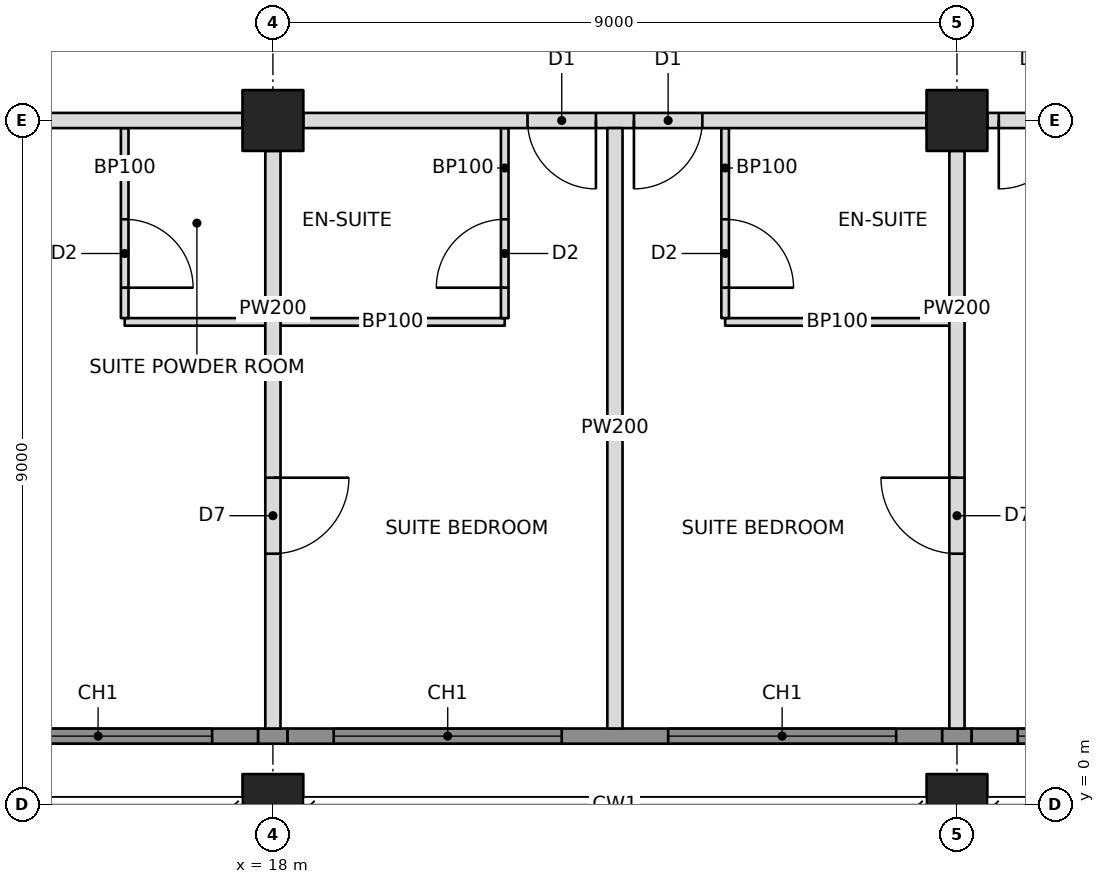
"""IFC4 building model, lengths in metres.
Left out: names, types, materials, properties, quantities, classifications, styles, units other than length and angle.
Written with IfcOpenShell. Run it as: python <this file> out.ifc"""

import sys

from ifc_helpers import new_model, si_unit, direction, frame, frame_2d, origin, origin_2d, place, context, subcontext, project, spatial, rectangle, hollow_rectangle, extrude, element, fill, save


model = new_model("IFC4")
c1 = context("Model", 3, precision=1e-05, world=origin(), true_north=direction((0.0, 1.0)))
c2 = subcontext(c1, "Body", "Model", "MODEL_VIEW")
j1 = project(units=[si_unit("LENGTHUNIT", "METRE"), si_unit("PLANEANGLEUNIT", "RADIAN")], contexts=[c1])
p1 = place(None, origin())
s1 = spatial("IfcSite", under=j1, at=p1, CompositionType="ELEMENT")
p2 = place(p1, origin())
s2 = spatial("IfcBuilding", under=s1, at=p2, CompositionType="ELEMENT")
p3 = place(p2, frame((0.0, 0.0, 214.8)))
s3 = spatial("IfcBuildingStorey", under=s2, at=p3, CompositionType="ELEMENT", Elevation=214.8)
p4 = place(p3, frame((18.0, 0.0, 0.0), z_axis=(0.0, 0.0, 1.0), x_axis=(1.0, 0.0, 0.0)))
e1 = element("IfcColumn", 1, at=p4, inside=s3, PredefinedType="COLUMN", context=c2, shape_type="SweptSolid", body=[
    extrude(hollow_rectangle(XDim=0.8, YDim=0.8, WallThickness=0.06, at=origin_2d()), origin(), (0.0, 0.0, 1.0), 3.4),
])
p5 = place(p3, frame((18.0, 9.0, 0.0), z_axis=(0.0, 0.0, 1.0), x_axis=(1.0, 0.0, 0.0)))
e2 = element("IfcColumn", 2, at=p5, inside=s3, PredefinedType="COLUMN", context=c2, shape_type="SweptSolid", body=[
    extrude(hollow_rectangle(XDim=0.8, YDim=0.8, WallThickness=0.05, at=origin_2d()), origin(), (0.0, 0.0, 1.0), 3.4),
])
p6 = place(p3, frame((27.0, 0.0, 0.0), z_axis=(0.0, 0.0, 1.0), x_axis=(1.0, 0.0, 0.0)))
e3 = element("IfcColumn", 3, at=p6, inside=s3, PredefinedType="COLUMN", context=c2, shape_type="SweptSolid", body=[
    extrude(hollow_rectangle(XDim=0.8, YDim=0.8, WallThickness=0.06, at=origin_2d()), origin(), (0.0, 0.0, 1.0), 3.4),
])
p7 = place(p3, frame((27.0, 9.0, 0.0), z_axis=(0.0, 0.0, 1.0), x_axis=(1.0, 0.0, 0.0)))
e4 = element("IfcColumn", 4, at=p7, inside=s3, PredefinedType="COLUMN", context=c2, shape_type="SweptSolid", body=[
    extrude(hollow_rectangle(XDim=0.8, YDim=0.8, WallThickness=0.05, at=origin_2d()), origin(), (0.0, 0.0, 1.0), 3.4),
])
p8 = place(p3, frame((9.4, 9.0, 0.0), z_axis=(0.0, 0.0, 1.0), x_axis=(1.0, 0.0, 0.0)))
e5 = element("IfcWall", 5, at=p8, inside=s3, PredefinedType="PARTITIONING", context=c2, shape_type="SweptSolid", body=[
    extrude(rectangle(XDim=8.2, YDim=0.2, at=frame_2d((4.1, 0.0))), origin(), (0.0, 0.0, 1.0), 2.405),
])
p9 = place(p8, frame((0.15, 0.0, 0.0)))
e6 = element("IfcOpeningElement", 6, at=p9, cuts=e5, PredefinedType="OPENING", context=c2, shape_type="SweptSolid", body=[
    extrude(rectangle(XDim=0.9, YDim=2.1, at=frame_2d((0.45, 1.05))), frame((0.0, 0.11, 0.0), z_axis=(0.0, -1.0, 0.0), x_axis=(1.0, 0.0, 0.0)), (0.0, 0.0, 1.0), 0.22),
])
p10 = place(p3, frame((18.4, 9.0, 0.0), z_axis=(0.0, 0.0, 1.0), x_axis=(1.0, 0.0, 0.0)))
e7 = element("IfcWall", 7, at=p10, inside=s3, PredefinedType="PARTITIONING", context=c2, shape_type="SweptSolid", body=[
    extrude(rectangle(XDim=8.2, YDim=0.2, at=frame_2d((4.1, 0.0))), origin(), (0.0, 0.0, 1.0), 2.405),
])
p11 = place(p10, frame((2.95, 0.0, 0.0)))
e8 = element("IfcOpeningElement", 8, at=p11, cuts=e7, PredefinedType="OPENING", context=c2, shape_type="SweptSolid", body=[
    extrude(rectangle(XDim=0.9, YDim=2.1, at=frame_2d((0.45, 1.05))), frame((0.0, 0.11, 0.0), z_axis=(0.0, -1.0, 0.0), x_axis=(1.0, 0.0, 0.0)), (0.0, 0.0, 1.0), 0.22),
])
p12 = place(p10, frame((4.35, 0.0, 0.0)))
e9 = element("IfcOpeningElement", 9, at=p12, cuts=e7, PredefinedType="OPENING", context=c2, shape_type="SweptSolid", body=[
    extrude(rectangle(XDim=0.9, YDim=2.1, at=frame_2d((0.45, 1.05))), frame((0.0, 0.11, 0.0), z_axis=(0.0, -1.0, 0.0), x_axis=(1.0, 0.0, 0.0)), (0.0, 0.0, 1.0), 0.22),
])
p13 = place(p3, frame((27.4, 9.0, 0.0), z_axis=(0.0, 0.0, 1.0), x_axis=(1.0, 0.0, 0.0)))
e10 = element("IfcWall", 10, at=p13, inside=s3, PredefinedType="PARTITIONING", context=c2, shape_type="SweptSolid", body=[
    extrude(rectangle(XDim=8.2, YDim=0.2, at=frame_2d((4.1, 0.0))), origin(), (0.0, 0.0, 1.0), 2.405),
])
p14 = place(p13, frame((0.15, 0.0, 0.0)))
e11 = element("IfcOpeningElement", 11, at=p14, cuts=e10, PredefinedType="OPENING", context=c2, shape_type="SweptSolid", body=[
    extrude(rectangle(XDim=0.9, YDim=2.1, at=frame_2d((0.45, 1.05))), frame((0.0, 0.11, 0.0), z_axis=(0.0, -1.0, 0.0), x_axis=(1.0, 0.0, 0.0)), (0.0, 0.0, 1.0), 0.22),
])
p15 = place(p3, frame((18.0, 8.6, 0.0), z_axis=(0.0, 0.0, 1.0), x_axis=(0.0, -1.0, 0.0)))
e12 = element("IfcWall", 12, at=p15, inside=s3, PredefinedType="PARTITIONING", context=c2, shape_type="SweptSolid", body=[
    extrude(rectangle(XDim=7.6, YDim=0.2, at=frame_2d((3.8, 0.0))), origin(), (0.0, 0.0, 1.0), 2.405),
])
p16 = place(p15, frame((4.3, 0.0, 0.0)))
e13 = element("IfcOpeningElement", 13, at=p16, cuts=e12, PredefinedType="OPENING", context=c2, shape_type="SweptSolid", body=[
    extrude(rectangle(XDim=1.0, YDim=2.1, at=frame_2d((0.5, 1.05))), frame((0.0, 0.11, 0.0), z_axis=(0.0, -1.0, 0.0), x_axis=(1.0, 0.0, 0.0)), (0.0, 0.0, 1.0), 0.22),
])
p17 = place(p3, frame((22.5, 8.9, 0.0), z_axis=(0.0, 0.0, 1.0), x_axis=(0.0, -1.0, 0.0)))
e14 = element("IfcWall", 14, at=p17, inside=s3, PredefinedType="PARTITIONING", context=c2, shape_type="SweptSolid", body=[
    extrude(rectangle(XDim=7.9, YDim=0.2, at=frame_2d((3.95, 0.0))), origin(), (0.0, 0.0, 1.0), 2.404),
])
p18 = place(p3, frame((27.0, 8.6, 0.0), z_axis=(0.0, 0.0, 1.0), x_axis=(0.0, -1.0, 0.0)))
e15 = element("IfcWall", 15, at=p18, inside=s3, PredefinedType="PARTITIONING", context=c2, shape_type="SweptSolid", body=[
    extrude(rectangle(XDim=7.6, YDim=0.2, at=frame_2d((3.8, 0.0))), origin(), (0.0, 0.0, 1.0), 2.405),
])
p19 = place(p18, frame((4.3, 0.0, 0.0)))
e16 = element("IfcOpeningElement", 16, at=p19, cuts=e15, PredefinedType="OPENING", context=c2, shape_type="SweptSolid", body=[
    extrude(rectangle(XDim=1.0, YDim=2.1, at=frame_2d((0.5, 1.05))), frame((0.0, 0.11, 0.0), z_axis=(0.0, -1.0, 0.0), x_axis=(1.0, 0.0, 0.0)), (0.0, 0.0, 1.0), 0.22),
])
p20 = place(p3, frame((16.05, 6.35, 0.0), z_axis=(0.0, 0.0, 1.0), x_axis=(1.0, 0.0, 0.0)))
e17 = element("IfcWall", 17, at=p20, inside=s3, PredefinedType="PARTITIONING", context=c2, shape_type="SweptSolid", body=[
    extrude(rectangle(XDim=1.85, YDim=0.1, at=frame_2d((0.925, 0.0))), origin(), (0.0, 0.0, 1.0), 2.404),
])
p21 = place(p3, frame((16.05, 8.9, 0.0), z_axis=(0.0, 0.0, 1.0), x_axis=(0.0, -1.0, 0.0)))
e18 = element("IfcWall", 18, at=p21, inside=s3, PredefinedType="PARTITIONING", context=c2, shape_type="SweptSolid", body=[
    extrude(rectangle(XDim=2.5, YDim=0.1, at=frame_2d((1.25, 0.0))), origin(), (0.0, 0.0, 1.0), 2.404),
])
p22 = place(p21, frame((1.2, 0.0, 0.0)))
e19 = element("IfcOpeningElement", 19, at=p22, cuts=e18, PredefinedType="OPENING", context=c2, shape_type="SweptSolid", body=[
    extrude(rectangle(XDim=0.9, YDim=2.1, at=frame_2d((0.45, 1.05))), frame((0.0, 0.06, 0.0), z_axis=(0.0, -1.0, 0.0), x_axis=(1.0, 0.0, 0.0)), (0.0, 0.0, 1.0), 0.12),
])
p23 = place(p3, frame((18.1, 6.35, 0.0), z_axis=(0.0, 0.0, 1.0), x_axis=(1.0, 0.0, 0.0)))
e20 = element("IfcWall", 20, at=p23, inside=s3, PredefinedType="PARTITIONING", context=c2, shape_type="SweptSolid", body=[
    extrude(rectangle(XDim=2.95, YDim=0.1, at=frame_2d((1.475, 0.0))), origin(), (0.0, 0.0, 1.0), 2.404),
])
p24 = place(p3, frame((21.05, 8.9, 0.0), z_axis=(0.0, 0.0, 1.0), x_axis=(0.0, -1.0, 0.0)))
e21 = element("IfcWall", 21, at=p24, inside=s3, PredefinedType="PARTITIONING", context=c2, shape_type="SweptSolid", body=[
    extrude(rectangle(XDim=2.5, YDim=0.1, at=frame_2d((1.25, 0.0))), origin(), (0.0, 0.0, 1.0), 2.404),
])
p25 = place(p24, frame((1.2, 0.0, 0.0)))
e22 = element("IfcOpeningElement", 22, at=p25, cuts=e21, PredefinedType="OPENING", context=c2, shape_type="SweptSolid", body=[
    extrude(rectangle(XDim=0.9, YDim=2.1, at=frame_2d((0.45, 1.05))), frame((0.0, 0.06, 0.0), z_axis=(0.0, -1.0, 0.0), x_axis=(1.0, 0.0, 0.0)), (0.0, 0.0, 1.0), 0.12),
])
p26 = place(p3, frame((23.95, 6.35, 0.0), z_axis=(0.0, 0.0, 1.0), x_axis=(1.0, 0.0, 0.0)))
e23 = element("IfcWall", 23, at=p26, inside=s3, PredefinedType="PARTITIONING", context=c2, shape_type="SweptSolid", body=[
    extrude(rectangle(XDim=2.95, YDim=0.1, at=frame_2d((1.475, 0.0))), origin(), (0.0, 0.0, 1.0), 2.404),
])
p27 = place(p3, frame((23.95, 8.9, 0.0), z_axis=(0.0, 0.0, 1.0), x_axis=(0.0, -1.0, 0.0)))
e24 = element("IfcWall", 24, at=p27, inside=s3, PredefinedType="PARTITIONING", context=c2, shape_type="SweptSolid", body=[
    extrude(rectangle(XDim=2.5, YDim=0.1, at=frame_2d((1.25, 0.0))), origin(), (0.0, 0.0, 1.0), 2.404),
])
p28 = place(p27, frame((1.2, 0.0, 0.0)))
e25 = element("IfcOpeningElement", 25, at=p28, cuts=e24, PredefinedType="OPENING", context=c2, shape_type="SweptSolid", body=[
    extrude(rectangle(XDim=0.9, YDim=2.1, at=frame_2d((0.45, 1.05))), frame((0.0, 0.06, 0.0), z_axis=(0.0, -1.0, 0.0), x_axis=(1.0, 0.0, 0.0)), (0.0, 0.0, 1.0), 0.12),
])
p29 = place(p3, frame((9.135, 0.9, 0.0), z_axis=(0.0, 0.0, 1.0), x_axis=(1.0, 0.0, 0.0)))
e26 = element("IfcWall", 26, at=p29, inside=s3, PredefinedType="SOLIDWALL", context=c2, shape_type="SweptSolid", body=[
    extrude(rectangle(XDim=8.671, YDim=0.2, at=frame_2d((4.335, 0.0))), origin(), (0.0, 0.0, 1.0), 3.2),
])
p30 = place(p29, frame((0.665, 0.0, 0.6)))
e27 = element("IfcOpeningElement", 27, at=p30, cuts=e26, PredefinedType="OPENING", context=c2, shape_type="SweptSolid", body=[
    extrude(rectangle(XDim=3.0, YDim=2.2, at=frame_2d((1.5, 1.1))), frame((0.0, 0.11, 0.0), z_axis=(0.0, -1.0, 0.0), x_axis=(1.0, 0.0, 0.0)), (0.0, 0.0, 1.0), 0.22),
])
p31 = place(p29, frame((5.065, 0.0, 0.6)))
e28 = element("IfcOpeningElement", 28, at=p31, cuts=e26, PredefinedType="OPENING", context=c2, shape_type="SweptSolid", body=[
    extrude(rectangle(XDim=3.0, YDim=2.2, at=frame_2d((1.5, 1.1))), frame((0.0, 0.11, 0.0), z_axis=(0.0, -1.0, 0.0), x_axis=(1.0, 0.0, 0.0)), (0.0, 0.0, 1.0), 0.22),
])
p32 = place(p3, frame((17.806, 0.9, 0.0), z_axis=(0.0, 0.0, 1.0), x_axis=(1.0, 0.0, 0.0)))
e29 = element("IfcWall", 29, at=p32, inside=s3, PredefinedType="SOLIDWALL", context=c2, shape_type="SweptSolid", body=[
    extrude(rectangle(XDim=0.388, YDim=0.2, at=frame_2d((0.194, 0.0))), origin(), (0.0, 0.0, 1.0), 2.404),
])
p33 = place(p3, frame((18.194, 0.9, 0.0), z_axis=(0.0, 0.0, 1.0), x_axis=(1.0, 0.0, 0.0)))
e30 = element("IfcWall", 30, at=p33, inside=s3, PredefinedType="SOLIDWALL", context=c2, shape_type="SweptSolid", body=[
    extrude(rectangle(XDim=8.612, YDim=0.2, at=frame_2d((4.306, 0.0))), origin(), (0.0, 0.0, 1.0), 3.2),
])
p34 = place(p33, frame((0.606, 0.0, 0.6)))
e31 = element("IfcOpeningElement", 31, at=p34, cuts=e30, PredefinedType="OPENING", context=c2, shape_type="SweptSolid", body=[
    extrude(rectangle(XDim=3.0, YDim=2.2, at=frame_2d((1.5, 1.1))), frame((0.0, 0.11, 0.0), z_axis=(0.0, -1.0, 0.0), x_axis=(1.0, 0.0, 0.0)), (0.0, 0.0, 1.0), 0.22),
])
p35 = place(p33, frame((5.006, 0.0, 0.6)))
e32 = element("IfcOpeningElement", 32, at=p35, cuts=e30, PredefinedType="OPENING", context=c2, shape_type="SweptSolid", body=[
    extrude(rectangle(XDim=3.0, YDim=2.2, at=frame_2d((1.5, 1.1))), frame((0.0, 0.11, 0.0), z_axis=(0.0, -1.0, 0.0), x_axis=(1.0, 0.0, 0.0)), (0.0, 0.0, 1.0), 0.22),
])
p36 = place(p3, frame((26.806, 0.9, 0.0), z_axis=(0.0, 0.0, 1.0), x_axis=(1.0, 0.0, 0.0)))
e33 = element("IfcWall", 33, at=p36, inside=s3, PredefinedType="SOLIDWALL", context=c2, shape_type="SweptSolid", body=[
    extrude(rectangle(XDim=0.388, YDim=0.2, at=frame_2d((0.194, 0.0))), origin(), (0.0, 0.0, 1.0), 2.404),
])
p37 = place(p3, frame((27.194, 0.9, 0.0), z_axis=(0.0, 0.0, 1.0), x_axis=(1.0, 0.0, 0.0)))
e34 = element("IfcWall", 34, at=p37, inside=s3, PredefinedType="SOLIDWALL", context=c2, shape_type="SweptSolid", body=[
    extrude(rectangle(XDim=8.671, YDim=0.2, at=frame_2d((4.335, 0.0))), origin(), (0.0, 0.0, 1.0), 3.2),
])
p38 = place(p37, frame((0.606, 0.0, 0.6)))
e35 = element("IfcOpeningElement", 35, at=p38, cuts=e34, PredefinedType="OPENING", context=c2, shape_type="SweptSolid", body=[
    extrude(rectangle(XDim=3.0, YDim=2.2, at=frame_2d((1.5, 1.1))), frame((0.0, 0.11, 0.0), z_axis=(0.0, -1.0, 0.0), x_axis=(1.0, 0.0, 0.0)), (0.0, 0.0, 1.0), 0.22),
])
p39 = place(p37, frame((5.006, 0.0, 0.6)))
e36 = element("IfcOpeningElement", 36, at=p39, cuts=e34, PredefinedType="OPENING", context=c2, shape_type="SweptSolid", body=[
    extrude(rectangle(XDim=3.0, YDim=2.2, at=frame_2d((1.5, 1.1))), frame((0.0, 0.11, 0.0), z_axis=(0.0, -1.0, 0.0), x_axis=(1.0, 0.0, 0.0)), (0.0, 0.0, 1.0), 0.22),
])
p40 = place(p31, origin())
e37 = element("IfcWindow", 37, at=p40, inside=s3, PartitioningType="TRIPLE_PANEL_VERTICAL", PredefinedType="WINDOW", context=c2, shape_type="SweptSolid", body=[
    extrude(rectangle(XDim=3.0, YDim=2.2, at=frame_2d((1.5, 1.1))), frame((0.0, 0.03, 0.0), z_axis=(0.0, -1.0, 0.0), x_axis=(1.0, 0.0, 0.0)), (0.0, 0.0, 1.0), 0.06),
])
fill(e28, e37)
p41 = place(p34, origin())
e38 = element("IfcWindow", 38, at=p41, inside=s3, PartitioningType="TRIPLE_PANEL_VERTICAL", PredefinedType="WINDOW", context=c2, shape_type="SweptSolid", body=[
    extrude(rectangle(XDim=3.0, YDim=2.2, at=frame_2d((1.5, 1.1))), frame((0.0, 0.03, 0.0), z_axis=(0.0, -1.0, 0.0), x_axis=(1.0, 0.0, 0.0)), (0.0, 0.0, 1.0), 0.06),
])
fill(e31, e38)
p42 = place(p35, origin())
e39 = element("IfcWindow", 39, at=p42, inside=s3, PartitioningType="TRIPLE_PANEL_VERTICAL", PredefinedType="WINDOW", context=c2, shape_type="SweptSolid", body=[
    extrude(rectangle(XDim=3.0, YDim=2.2, at=frame_2d((1.5, 1.1))), frame((0.0, 0.03, 0.0), z_axis=(0.0, -1.0, 0.0), x_axis=(1.0, 0.0, 0.0)), (0.0, 0.0, 1.0), 0.06),
])
fill(e32, e39)
p43 = place(p38, origin())
e40 = element("IfcWindow", 40, at=p43, inside=s3, PartitioningType="TRIPLE_PANEL_VERTICAL", PredefinedType="WINDOW", context=c2, shape_type="SweptSolid", body=[
    extrude(rectangle(XDim=3.0, YDim=2.2, at=frame_2d((1.5, 1.1))), frame((0.0, 0.03, 0.0), z_axis=(0.0, -1.0, 0.0), x_axis=(1.0, 0.0, 0.0)), (0.0, 0.0, 1.0), 0.06),
])
fill(e35, e40)
p44 = place(p16, origin())
e41 = element("IfcDoor", 41, at=p44, inside=s3, OperationType="SINGLE_SWING_LEFT", PredefinedType="DOOR", context=c2, shape_type="SweptSolid", body=[
    extrude(rectangle(XDim=1.0, YDim=2.1, at=frame_2d((0.5, 1.05))), frame((0.0, 0.025, 0.0), z_axis=(0.0, -1.0, 0.0), x_axis=(1.0, 0.0, 0.0)), (0.0, 0.0, 1.0), 0.05),
])
fill(e13, e41)
p45 = place(p19, frame((1.0, 0.0, 0.0), z_axis=(0.0, 0.0, 1.0), x_axis=(-1.0, 0.0, 0.0)))
e42 = element("IfcDoor", 42, at=p45, inside=s3, OperationType="SINGLE_SWING_RIGHT", PredefinedType="DOOR", context=c2, shape_type="SweptSolid", body=[
    extrude(rectangle(XDim=1.0, YDim=2.1, at=frame_2d((0.5, 1.05))), frame((0.0, 0.025, 0.0), z_axis=(0.0, -1.0, 0.0), x_axis=(1.0, 0.0, 0.0)), (0.0, 0.0, 1.0), 0.05),
])
fill(e16, e42)
p46 = place(p22, origin())
e43 = element("IfcDoor", 43, at=p46, inside=s3, OperationType="SINGLE_SWING_RIGHT", PredefinedType="DOOR", context=c2, shape_type="SweptSolid", body=[
    extrude(rectangle(XDim=0.9, YDim=2.1, at=frame_2d((0.45, 1.05))), frame((0.0, 0.025, 0.0), z_axis=(0.0, -1.0, 0.0), x_axis=(1.0, 0.0, 0.0)), (0.0, 0.0, 1.0), 0.05),
])
fill(e19, e43)
p47 = place(p25, frame((0.9, 0.0, 0.0), z_axis=(0.0, 0.0, 1.0), x_axis=(-1.0, 0.0, 0.0)))
e44 = element("IfcDoor", 44, at=p47, inside=s3, OperationType="SINGLE_SWING_LEFT", PredefinedType="DOOR", context=c2, shape_type="SweptSolid", body=[
    extrude(rectangle(XDim=0.9, YDim=2.1, at=frame_2d((0.45, 1.05))), frame((0.0, 0.025, 0.0), z_axis=(0.0, -1.0, 0.0), x_axis=(1.0, 0.0, 0.0)), (0.0, 0.0, 1.0), 0.05),
])
fill(e22, e44)
p48 = place(p11, frame((0.9, 0.0, 0.0), z_axis=(0.0, 0.0, 1.0), x_axis=(-1.0, 0.0, 0.0)))
e45 = element("IfcDoor", 45, at=p48, inside=s3, OperationType="SINGLE_SWING_LEFT", PredefinedType="DOOR", context=c2, shape_type="SweptSolid", body=[
    extrude(rectangle(XDim=0.9, YDim=2.1, at=frame_2d((0.45, 1.05))), frame((0.0, 0.025, 0.0), z_axis=(0.0, -1.0, 0.0), x_axis=(1.0, 0.0, 0.0)), (0.0, 0.0, 1.0), 0.05),
])
fill(e8, e45)
p49 = place(p28, origin())
e46 = element("IfcDoor", 46, at=p49, inside=s3, OperationType="SINGLE_SWING_RIGHT", PredefinedType="DOOR", context=c2, shape_type="SweptSolid", body=[
    extrude(rectangle(XDim=0.9, YDim=2.1, at=frame_2d((0.45, 1.05))), frame((0.0, 0.025, 0.0), z_axis=(0.0, -1.0, 0.0), x_axis=(1.0, 0.0, 0.0)), (0.0, 0.0, 1.0), 0.05),
])
fill(e25, e46)
p50 = place(p12, frame((0.9, 0.0, 0.0), z_axis=(0.0, 0.0, 1.0), x_axis=(-1.0, 0.0, 0.0)))
e47 = element("IfcDoor", 47, at=p50, inside=s3, OperationType="SINGLE_SWING_RIGHT", PredefinedType="DOOR", context=c2, shape_type="SweptSolid", body=[
    extrude(rectangle(XDim=0.9, YDim=2.1, at=frame_2d((0.45, 1.05))), frame((0.0, 0.025, 0.0), z_axis=(0.0, -1.0, 0.0), x_axis=(1.0, 0.0, 0.0)), (0.0, 0.0, 1.0), 0.05),
])
fill(e9, e47)
p51 = place(p14, frame((0.9, 0.0, 0.0), z_axis=(0.0, 0.0, 1.0), x_axis=(-1.0, 0.0, 0.0)))
e48 = element("IfcDoor", 48, at=p51, inside=s3, OperationType="SINGLE_SWING_RIGHT", PredefinedType="DOOR", context=c2, shape_type="SweptSolid", body=[
    extrude(rectangle(XDim=0.9, YDim=2.1, at=frame_2d((0.45, 1.05))), frame((0.0, 0.025, 0.0), z_axis=(0.0, -1.0, 0.0), x_axis=(1.0, 0.0, 0.0)), (0.0, 0.0, 1.0), 0.05),
])
fill(e11, e48)
save(model, sys.argv[1])
